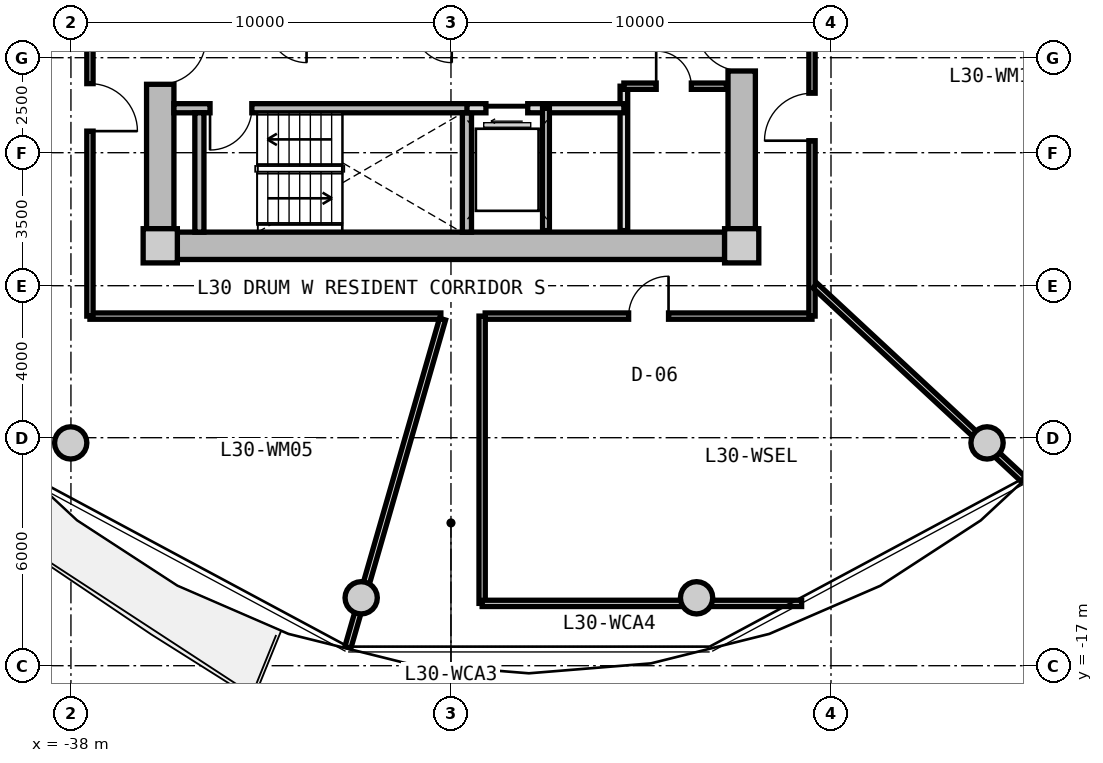
"""IFC4 building model, lengths in metres.
Left out: names, types, materials, properties, quantities, classifications, styles, units other than length and angle.
Written with IfcOpenShell. Run it as: python <this file> out.ifc"""

import sys

from ifc_helpers import new_model, si_unit, direction, frame, frame_2d, origin, origin_2d, place, context, subcontext, project, spatial, rectangle, circle, extrude, source, transform, mapped, element, fill, save


model = new_model("IFC4")
c1 = context("Model", 3, precision=1e-05, world=origin(), true_north=direction((0.0, 1.0)))
c2 = subcontext(c1, "Body", "Model", "MODEL_VIEW")
j1 = project(units=[si_unit("LENGTHUNIT", "METRE"), si_unit("PLANEANGLEUNIT", "RADIAN")], contexts=[c1])
p1 = place(None, origin())
s1 = spatial("IfcSite", under=j1, at=p1, CompositionType="ELEMENT")
p2 = place(p1, origin())
s2 = spatial("IfcBuilding", under=s1, at=p2, CompositionType="ELEMENT")
p3 = place(p2, frame((0.0, 0.0, 99.3)))
s3 = spatial("IfcBuildingStorey", under=s2, at=p3, CompositionType="ELEMENT", Elevation=99.3)
m1 = source(origin(), c2, "Body", "SweptSolid", [
    extrude(rectangle(XDim=0.9, YDim=0.9, at=origin_2d()), origin(), (0.0, 0.0, 1.0), 3.05),
])
for number, where, z_axis, x_axis in (
    (1, (-35.65, -5.95, 0.0), (0.0, 0.0, 1.0), (1.0, 0.0, 0.0)),
    (2, (-20.35, -5.95, 0.0), (0.0, 0.0, 1.0), (1.0, 0.0, 0.0)),
):
    element("IfcColumn", number, at=place(p3, frame(where, z_axis=z_axis, x_axis=x_axis)), inside=s3, PredefinedType="COLUMN", context=c2, shape_type="MappedRepresentation", body=[
        mapped(m1, transform((0.0, 0.0, 0.0), x_axis=(1.0, 0.0, 0.0), y_axis=(0.0, 1.0, 0.0), z_axis=(0.0, 0.0, 1.0), scale=1.0)),
    ])
m2 = source(origin(), c2, "Body", "SweptSolid", [
    extrude(rectangle(XDim=14.4, YDim=0.72, at=frame_2d((7.2, 0.0))), origin(), (0.0, 0.0, 1.0), 2.79),
])
p4 = place(p3, frame((-20.8, -5.95, 0.0), z_axis=(0.0, 0.0, 1.0), x_axis=(-1.0, 0.0, 0.0)))
e3 = element("IfcWall", 3, at=p4, inside=s3, PredefinedType="SHEAR", context=c2, shape_type="MappedRepresentation", body=[
    mapped(m2, transform((0.0, 0.0, 0.0), x_axis=(1.0, 0.0, 0.0), y_axis=(0.0, 1.0, 0.0), z_axis=(0.0, 0.0, 1.0), scale=1.0)),
])
m3 = source(origin(), c2, "Body", "SweptSolid", [
    extrude(rectangle(XDim=11.0, YDim=0.72, at=frame_2d((5.5, 0.0))), origin(), (0.0, 0.0, 1.0), 2.79),
])
p5 = place(p3, frame((-35.65, -5.5, 0.0), z_axis=(0.0, 0.0, 1.0), x_axis=(0.0, 1.0, 0.0)))
e4 = element("IfcWall", 4, at=p5, inside=s3, PredefinedType="SHEAR", context=c2, shape_type="MappedRepresentation", body=[
    mapped(m3, transform((0.0, 0.0, 0.0), x_axis=(1.0, 0.0, 0.0), y_axis=(0.0, 1.0, 0.0), z_axis=(0.0, 0.0, 1.0), scale=1.0)),
])
p6 = place(p5, frame((3.8, 0.0, 0.0)))
e5 = element("IfcOpeningElement", 5, at=p6, cuts=e4, PredefinedType="OPENING", context=c2, shape_type="SweptSolid", body=[
    extrude(rectangle(XDim=1.2, YDim=2.15, at=frame_2d((0.6, 1.075))), frame((0.0, 0.37, 0.0), z_axis=(0.0, -1.0, 0.0), x_axis=(1.0, 0.0, 0.0)), (0.0, 0.0, 1.0), 0.74),
])
p7 = place(p3, frame((-20.35, 5.5, 0.0), z_axis=(0.0, 0.0, 1.0), x_axis=(0.0, -1.0, 0.0)))
e6 = element("IfcWall", 6, at=p7, inside=s3, PredefinedType="SHEAR", context=c2, shape_type="MappedRepresentation", body=[
    mapped(m3, transform((0.0, 0.0, 0.0), x_axis=(1.0, 0.0, 0.0), y_axis=(0.0, 1.0, 0.0), z_axis=(0.0, 0.0, 1.0), scale=1.0)),
])
p8 = place(p7, frame((5.65, 0.0, 0.0)))
e7 = element("IfcOpeningElement", 7, at=p8, cuts=e6, PredefinedType="OPENING", context=c2, shape_type="SweptSolid", body=[
    extrude(rectangle(XDim=1.2, YDim=2.15, at=frame_2d((0.6, 1.075))), frame((0.0, 0.37, 0.0), z_axis=(0.0, -1.0, 0.0), x_axis=(1.0, 0.0, 0.0)), (0.0, 0.0, 1.0), 0.74),
])
m4 = source(origin(), c2, "Body", "SweptSolid", [
    extrude(circle(Radius=0.425, at=origin_2d()), origin(), (0.0, 0.0, 1.0), 3.05),
])
for number, where, z_axis, x_axis in (
    (8, (-38.006, -11.137, 0.0), (0.0, 0.0, 1.0), (1.0, 0.0, 0.0)),
    (9, (-30.363, -15.213, 0.0), (0.0, 0.0, 1.0), (1.0, 0.0, 0.0)),
    (10, (-21.537, -15.213, 0.0), (0.0, 0.0, 1.0), (1.0, 0.0, 0.0)),
    (11, (-13.894, -11.137, 0.0), (0.0, 0.0, 1.0), (1.0, 0.0, 0.0)),
):
    element("IfcColumn", number, at=place(p3, frame(where, z_axis=z_axis, x_axis=x_axis)), inside=s3, PredefinedType="COLUMN", context=c2, shape_type="MappedRepresentation", body=[
        mapped(m4, transform((0.0, 0.0, 0.0), x_axis=(1.0, 0.0, 0.0), y_axis=(0.0, 1.0, 0.0), z_axis=(0.0, 0.0, 1.0), scale=1.0)),
    ])
m5 = source(origin(), c2, "Body", "SweptSolid", [
    extrude(rectangle(XDim=7.83, YDim=0.24, at=frame_2d((3.915, 0.0))), origin(), (0.0, 0.0, 1.0), 2.79),
])
p9 = place(p3, frame((-35.29, -2.33, 0.0), z_axis=(0.0, 0.0, 1.0), x_axis=(1.0, 0.0, 0.0)))
e12 = element("IfcWall", 12, at=p9, inside=s3, PredefinedType="PARTITIONING", context=c2, shape_type="MappedRepresentation", body=[
    mapped(m5, transform((0.0, 0.0, 0.0), x_axis=(1.0, 0.0, 0.0), y_axis=(0.0, 1.0, 0.0), z_axis=(0.0, 0.0, 1.0), scale=1.0)),
])
p10 = place(p9, frame((0.95, 0.0, 0.0)))
e13 = element("IfcOpeningElement", 13, at=p10, cuts=e12, PredefinedType="OPENING", context=c2, shape_type="SweptSolid", body=[
    extrude(rectangle(XDim=1.1, YDim=2.15, at=frame_2d((0.55, 1.075))), frame((0.0, 0.13, 0.0), z_axis=(0.0, -1.0, 0.0), x_axis=(1.0, 0.0, 0.0)), (0.0, 0.0, 1.0), 0.26),
])
m6 = source(origin(), c2, "Body", "SweptSolid", [
    extrude(rectangle(XDim=3.14, YDim=0.24, at=frame_2d((1.57, 0.0))), origin(), (0.0, 0.0, 1.0), 2.79),
])
for number, where, z_axis, x_axis in (
    (14, (-34.62, -5.59, 0.0), (0.0, 0.0, 1.0), (0.0, 1.0, 0.0)),
    (15, (-27.58, -5.59, 0.0), (0.0, 0.0, 1.0), (0.0, 1.0, 0.0)),
):
    element("IfcWall", number, at=place(p3, frame(where, z_axis=z_axis, x_axis=x_axis)), inside=s3, PredefinedType="PARTITIONING", context=c2, shape_type="MappedRepresentation", body=[
        mapped(m6, transform((0.0, 0.0, 0.0), x_axis=(1.0, 0.0, 0.0), y_axis=(0.0, 1.0, 0.0), z_axis=(0.0, 0.0, 1.0), scale=1.0)),
    ])
m7 = source(origin(), c2, "Body", "SweptSolid", [
    extrude(rectangle(XDim=3.8, YDim=0.2, at=frame_2d((1.9, 0.0))), origin(), (0.0, 0.0, 1.0), 2.775),
])
p11 = place(p3, frame((-23.45, -5.55, 0.0), z_axis=(0.0, 0.0, 1.0), x_axis=(0.0, 1.0, 0.0)))
e16 = element("IfcWall", 16, at=p11, inside=s3, PredefinedType="PARTITIONING", context=c2, shape_type="MappedRepresentation", body=[
    mapped(m7, transform((0.0, 0.0, 0.0), x_axis=(1.0, 0.0, 0.0), y_axis=(0.0, 1.0, 0.0), z_axis=(0.0, 0.0, 1.0), scale=1.0)),
])
m8 = source(origin(), c2, "Body", "SweptSolid", [
    extrude(rectangle(XDim=4.13, YDim=0.24, at=frame_2d((2.065, 0.0))), origin(), (0.0, 0.0, 1.0), 2.775),
])
p12 = place(p3, frame((-27.58, -2.33, 0.0), z_axis=(0.0, 0.0, 1.0), x_axis=(1.0, 0.0, 0.0)))
e17 = element("IfcWall", 17, at=p12, inside=s3, PredefinedType="PARTITIONING", context=c2, shape_type="MappedRepresentation", body=[
    mapped(m8, transform((0.0, 0.0, 0.0), x_axis=(1.0, 0.0, 0.0), y_axis=(0.0, 1.0, 0.0), z_axis=(0.0, 0.0, 1.0), scale=1.0)),
])
p13 = place(p12, frame((0.5, 0.0, 0.0)))
e18 = element("IfcOpeningElement", 18, at=p13, cuts=e17, PredefinedType="OPENING", context=c2, shape_type="SweptSolid", body=[
    extrude(rectangle(XDim=1.1, YDim=2.2, at=frame_2d((0.55, 1.1))), frame((0.0, 0.13, 0.0), z_axis=(0.0, -1.0, 0.0), x_axis=(1.0, 0.0, 0.0)), (0.0, 0.0, 1.0), 0.26),
])
m9 = source(origin(), c2, "Body", "SweptSolid", [
    extrude(rectangle(XDim=3.22, YDim=0.18, at=frame_2d((1.61, 0.0))), origin(), (0.0, 0.0, 1.0), 2.775),
])
p14 = place(p3, frame((-25.5, -5.55, 0.0), z_axis=(0.0, 0.0, 1.0), x_axis=(0.0, 1.0, 0.0)))
e19 = element("IfcWall", 19, at=p14, inside=s3, PredefinedType="PARTITIONING", context=c2, shape_type="MappedRepresentation", body=[
    mapped(m9, transform((0.0, 0.0, 0.0), x_axis=(1.0, 0.0, 0.0), y_axis=(0.0, 1.0, 0.0), z_axis=(0.0, 0.0, 1.0), scale=1.0)),
])
m10 = source(origin(), c2, "Body", "SweptSolid", [
    extrude(rectangle(XDim=2.7, YDim=0.165, at=frame_2d((1.35, 0.0))), origin(), (0.0, 0.0, 1.0), 2.775),
])
p15 = place(p3, frame((-23.45, -1.75, 0.0), z_axis=(0.0, 0.0, 1.0), x_axis=(1.0, 0.0, 0.0)))
e20 = element("IfcWall", 20, at=p15, inside=s3, PredefinedType="PARTITIONING", context=c2, shape_type="MappedRepresentation", body=[
    mapped(m10, transform((0.0, 0.0, 0.0), x_axis=(1.0, 0.0, 0.0), y_axis=(0.0, 1.0, 0.0), z_axis=(0.0, 0.0, 1.0), scale=1.0)),
])
p16 = place(p15, frame((0.85, 0.0, 0.0)))
e21 = element("IfcOpeningElement", 21, at=p16, cuts=e20, PredefinedType="OPENING", context=c2, shape_type="SweptSolid", body=[
    extrude(rectangle(XDim=0.925, YDim=2.1, at=frame_2d((0.462, 1.05))), frame((0.0, 0.093, 0.0), z_axis=(0.0, -1.0, 0.0), x_axis=(1.0, 0.0, 0.0)), (0.0, 0.0, 1.0), 0.185),
])
m11 = source(origin(), c2, "Body", "SweptSolid", [
    extrude(rectangle(XDim=8.6, YDim=0.165, at=frame_2d((4.3, 0.0))), origin(), (0.0, 0.0, 1.0), 2.775),
])
p17 = place(p3, frame((-18.5, -7.8, 0.0), z_axis=(0.0, 0.0, 1.0), x_axis=(-1.0, 0.0, 0.0)))
e22 = element("IfcWall", 22, at=p17, inside=s3, PredefinedType="PARTITIONING", context=c2, shape_type="MappedRepresentation", body=[
    mapped(m11, transform((0.0, 0.0, 0.0), x_axis=(1.0, 0.0, 0.0), y_axis=(0.0, 1.0, 0.0), z_axis=(0.0, 0.0, 1.0), scale=1.0)),
])
p18 = place(p17, frame((3.775, 0.0, 0.0)))
e23 = element("IfcOpeningElement", 23, at=p18, cuts=e22, PredefinedType="OPENING", context=c2, shape_type="SweptSolid", body=[
    extrude(rectangle(XDim=1.05, YDim=2.15, at=frame_2d((0.525, 1.075))), frame((0.0, 0.093, 0.0), z_axis=(0.0, -1.0, 0.0), x_axis=(1.0, 0.0, 0.0)), (0.0, 0.0, 1.0), 0.185),
])
m12 = source(origin(), c2, "Body", "SweptSolid", [
    extrude(rectangle(XDim=9.234, YDim=0.165, at=frame_2d((4.617, 0.0))), origin(), (0.0, 0.0, 1.0), 2.775),
])
p19 = place(p3, frame((-28.266, -7.8, 0.0), z_axis=(0.0, 0.0, 1.0), x_axis=(-1.0, 0.0, 0.0)))
e24 = element("IfcWall", 24, at=p19, inside=s3, PredefinedType="PARTITIONING", context=c2, shape_type="MappedRepresentation", body=[
    mapped(m12, transform((0.0, 0.0, 0.0), x_axis=(1.0, 0.0, 0.0), y_axis=(0.0, 1.0, 0.0), z_axis=(0.0, 0.0, 1.0), scale=1.0)),
])
m13 = source(origin(), c2, "Body", "SweptSolid", [
    extrude(rectangle(XDim=15.6, YDim=0.165, at=frame_2d((7.8, 0.0))), origin(), (0.0, 0.0, 1.0), 2.775),
])
p20 = place(p3, frame((-37.5, -7.8, 0.0), z_axis=(0.0, 0.0, 1.0), x_axis=(0.0, 1.0, 0.0)))
e25 = element("IfcWall", 25, at=p20, inside=s3, PredefinedType="PARTITIONING", context=c2, shape_type="MappedRepresentation", body=[
    mapped(m13, transform((0.0, 0.0, 0.0), x_axis=(1.0, 0.0, 0.0), y_axis=(0.0, 1.0, 0.0), z_axis=(0.0, 0.0, 1.0), scale=1.0)),
])
p21 = place(p20, frame((11.994, 0.0, 0.0)))
e26 = element("IfcOpeningElement", 26, at=p21, cuts=e25, PredefinedType="OPENING", context=c2, shape_type="SweptSolid", body=[
    extrude(rectangle(XDim=1.25, YDim=2.2, at=frame_2d((0.625, 1.1))), frame((0.0, 0.093, 0.0), z_axis=(0.0, -1.0, 0.0), x_axis=(1.0, 0.0, 0.0)), (0.0, 0.0, 1.0), 0.185),
])
p22 = place(p20, frame((4.867, 0.0, 0.0)))
e27 = element("IfcOpeningElement", 27, at=p22, cuts=e25, PredefinedType="OPENING", context=c2, shape_type="SweptSolid", body=[
    extrude(rectangle(XDim=1.25, YDim=2.2, at=frame_2d((0.625, 1.1))), frame((0.0, 0.093, 0.0), z_axis=(0.0, -1.0, 0.0), x_axis=(1.0, 0.0, 0.0)), (0.0, 0.0, 1.0), 0.185),
])
p23 = place(p3, frame((-18.5, 7.8, 0.0), z_axis=(0.0, 0.0, 1.0), x_axis=(0.0, -1.0, 0.0)))
e28 = element("IfcWall", 28, at=p23, inside=s3, PredefinedType="PARTITIONING", context=c2, shape_type="MappedRepresentation", body=[
    mapped(m13, transform((0.0, 0.0, 0.0), x_axis=(1.0, 0.0, 0.0), y_axis=(0.0, 1.0, 0.0), z_axis=(0.0, 0.0, 1.0), scale=1.0)),
])
p24 = place(p23, frame((9.734, 0.0, 0.0)))
e29 = element("IfcOpeningElement", 29, at=p24, cuts=e28, PredefinedType="OPENING", context=c2, shape_type="SweptSolid", body=[
    extrude(rectangle(XDim=1.25, YDim=2.2, at=frame_2d((0.625, 1.1))), frame((0.0, 0.093, 0.0), z_axis=(0.0, -1.0, 0.0), x_axis=(1.0, 0.0, 0.0)), (0.0, 0.0, 1.0), 0.185),
])
p25 = place(p23, frame((4.739, 0.0, 0.0)))
e30 = element("IfcOpeningElement", 30, at=p25, cuts=e28, PredefinedType="OPENING", context=c2, shape_type="SweptSolid", body=[
    extrude(rectangle(XDim=0.92, YDim=2.1, at=frame_2d((0.46, 1.05))), frame((0.0, 0.093, 0.0), z_axis=(0.0, -1.0, 0.0), x_axis=(1.0, 0.0, 0.0)), (0.0, 0.0, 1.0), 0.185),
])
p26 = place(p23, frame((2.096, 0.0, 0.0)))
e31 = element("IfcOpeningElement", 31, at=p26, cuts=e28, PredefinedType="OPENING", context=c2, shape_type="SweptSolid", body=[
    extrude(rectangle(XDim=0.92, YDim=2.1, at=frame_2d((0.46, 1.05))), frame((0.0, 0.093, 0.0), z_axis=(0.0, -1.0, 0.0), x_axis=(1.0, 0.0, 0.0)), (0.0, 0.0, 1.0), 0.185),
])
m14 = source(origin(), c2, "Body", "SweptSolid", [
    extrude(rectangle(XDim=8.989, YDim=0.165, at=frame_2d((4.495, 0.0))), origin(), (0.0, 0.0, 1.0), 2.275),
])
p27 = place(p3, frame((-28.222, -7.88, 0.0), z_axis=(0.0, 0.0, 1.0), x_axis=(-0.27702323008, -0.960863221274, 0.0)))
e32 = element("IfcWall", 32, at=p27, inside=s3, PredefinedType="PARTITIONING", context=c2, shape_type="MappedRepresentation", body=[
    mapped(m14, transform((0.0, 0.0, 0.0), x_axis=(1.0, 0.0, 0.0), y_axis=(0.0, 1.0, 0.0), z_axis=(0.0, 0.0, 1.0), scale=1.0)),
])
m15 = source(origin(), c2, "Body", "SweptSolid", [
    extrude(rectangle(XDim=7.482, YDim=0.165, at=frame_2d((3.741, 0.0))), origin(), (0.0, 0.0, 1.0), 2.275),
])
p28 = place(p3, frame((-18.42, -6.998, 0.0), z_axis=(0.0, 0.0, 1.0), x_axis=(0.732508698043, -0.680757671489, 0.0)))
e33 = element("IfcWall", 33, at=p28, inside=s3, PredefinedType="PARTITIONING", context=c2, shape_type="MappedRepresentation", body=[
    mapped(m15, transform((0.0, 0.0, 0.0), x_axis=(1.0, 0.0, 0.0), y_axis=(0.0, 1.0, 0.0), z_axis=(0.0, 0.0, 1.0), scale=1.0)),
])
m16 = source(origin(), c2, "Body", "SweptSolid", [
    extrude(rectangle(XDim=7.56, YDim=0.165, at=frame_2d((3.78, 0.0))), origin(), (0.0, 0.0, 1.0), 2.775),
])
p29 = place(p3, frame((-27.18, -15.36, 0.0), z_axis=(0.0, 0.0, 1.0), x_axis=(0.0, 1.0, 0.0)))
e34 = element("IfcWall", 34, at=p29, inside=s3, PredefinedType="PARTITIONING", context=c2, shape_type="MappedRepresentation", body=[
    mapped(m16, transform((0.0, 0.0, 0.0), x_axis=(1.0, 0.0, 0.0), y_axis=(0.0, 1.0, 0.0), z_axis=(0.0, 0.0, 1.0), scale=1.0)),
])
m17 = source(origin(), c2, "Body", "SweptSolid", [
    extrude(rectangle(XDim=8.407, YDim=0.165, at=frame_2d((4.204, 0.0))), origin(), (0.0, 0.0, 1.0), 2.275),
])
p30 = place(p3, frame((-27.18, -15.36, 0.0), z_axis=(0.0, 0.0, 1.0), x_axis=(1.0, 0.0, 0.0)))
e35 = element("IfcWall", 35, at=p30, inside=s3, PredefinedType="PARTITIONING", context=c2, shape_type="MappedRepresentation", body=[
    mapped(m17, transform((0.0, 0.0, 0.0), x_axis=(1.0, 0.0, 0.0), y_axis=(0.0, 1.0, 0.0), z_axis=(0.0, 0.0, 1.0), scale=1.0)),
])
m18 = source(origin(), c2, "Body", "SweptSolid", [
    extrude(rectangle(XDim=1.1, YDim=2.15, at=frame_2d((0.55, 1.075))), frame((0.0, 0.025, 0.0), z_axis=(0.0, -1.0, 0.0), x_axis=(1.0, 0.0, 0.0)), (0.0, 0.0, 1.0), 0.05),
])
p31 = place(p10, frame((1.1, 0.0, 0.0), z_axis=(0.0, 0.0, 1.0), x_axis=(-1.0, 0.0, 0.0)))
e36 = element("IfcDoor", 36, at=p31, inside=s3, OperationType="SINGLE_SWING_RIGHT", PredefinedType="DOOR", context=c2, shape_type="MappedRepresentation", body=[
    mapped(m18, transform((0.0, 0.0, 0.0), x_axis=(1.0, 0.0, 0.0), y_axis=(0.0, 1.0, 0.0), z_axis=(0.0, 0.0, 1.0), scale=1.0)),
])
fill(e13, e36)
m19 = source(origin(), c2, "Body", "SweptSolid", [
    extrude(rectangle(XDim=1.2, YDim=2.15, at=frame_2d((0.6, 1.075))), frame((0.0, 0.025, 0.0), z_axis=(0.0, -1.0, 0.0), x_axis=(1.0, 0.0, 0.0)), (0.0, 0.0, 1.0), 0.05),
])
p32 = place(p6, frame((1.2, 0.0, 0.0), z_axis=(0.0, 0.0, 1.0), x_axis=(-1.0, 0.0, 0.0)))
e37 = element("IfcDoor", 37, at=p32, inside=s3, OperationType="SINGLE_SWING_LEFT", PredefinedType="DOOR", context=c2, shape_type="MappedRepresentation", body=[
    mapped(m19, transform((0.0, 0.0, 0.0), x_axis=(1.0, 0.0, 0.0), y_axis=(0.0, 1.0, 0.0), z_axis=(0.0, 0.0, 1.0), scale=1.0)),
])
fill(e5, e37)
p33 = place(p8, frame((1.2, 0.0, 0.0), z_axis=(0.0, 0.0, 1.0), x_axis=(-1.0, 0.0, 0.0)))
e38 = element("IfcDoor", 38, at=p33, inside=s3, OperationType="SINGLE_SWING_RIGHT", PredefinedType="DOOR", context=c2, shape_type="MappedRepresentation", body=[
    mapped(m19, transform((0.0, 0.0, 0.0), x_axis=(1.0, 0.0, 0.0), y_axis=(0.0, 1.0, 0.0), z_axis=(0.0, 0.0, 1.0), scale=1.0)),
])
fill(e7, e38)
m20 = source(origin(), c2, "Body", "SweptSolid", [
    extrude(rectangle(XDim=1.1, YDim=2.2, at=frame_2d((0.55, 1.1))), frame((0.0, 0.025, 0.0), z_axis=(0.0, -1.0, 0.0), x_axis=(1.0, 0.0, 0.0)), (0.0, 0.0, 1.0), 0.05),
])
p34 = place(p13, frame((1.1, 0.0, 0.0), z_axis=(0.0, 0.0, 1.0), x_axis=(-1.0, 0.0, 0.0)))
e39 = element("IfcDoor", 39, at=p34, inside=s3, OperationType="SLIDING_TO_LEFT", PredefinedType="DOOR", context=c2, shape_type="MappedRepresentation", body=[
    mapped(m20, transform((0.0, 0.0, 0.0), x_axis=(1.0, 0.0, 0.0), y_axis=(0.0, 1.0, 0.0), z_axis=(0.0, 0.0, 1.0), scale=1.0)),
])
fill(e18, e39)
m21 = source(origin(), c2, "Body", "SweptSolid", [
    extrude(rectangle(XDim=0.925, YDim=2.1, at=frame_2d((0.462, 1.05))), frame((0.0, 0.025, 0.0), z_axis=(0.0, -1.0, 0.0), x_axis=(1.0, 0.0, 0.0)), (0.0, 0.0, 1.0), 0.05),
])
p35 = place(p16, origin())
e40 = element("IfcDoor", 40, at=p35, inside=s3, OperationType="SINGLE_SWING_LEFT", PredefinedType="DOOR", context=c2, shape_type="MappedRepresentation", body=[
    mapped(m21, transform((0.0, 0.0, 0.0), x_axis=(1.0, 0.0, 0.0), y_axis=(0.0, 1.0, 0.0), z_axis=(0.0, 0.0, 1.0), scale=1.0)),
])
fill(e21, e40)
m22 = source(origin(), c2, "Body", "SweptSolid", [
    extrude(rectangle(XDim=1.05, YDim=2.15, at=frame_2d((0.525, 1.075))), frame((0.0, 0.025, 0.0), z_axis=(0.0, -1.0, 0.0), x_axis=(1.0, 0.0, 0.0)), (0.0, 0.0, 1.0), 0.05),
])
p36 = place(p18, frame((1.05, 0.0, 0.0), z_axis=(0.0, 0.0, 1.0), x_axis=(-1.0, 0.0, 0.0)))
e41 = element("IfcDoor", 41, at=p36, inside=s3, OperationType="SINGLE_SWING_RIGHT", PredefinedType="DOOR", context=c2, shape_type="MappedRepresentation", body=[
    mapped(m22, transform((0.0, 0.0, 0.0), x_axis=(1.0, 0.0, 0.0), y_axis=(0.0, 1.0, 0.0), z_axis=(0.0, 0.0, 1.0), scale=1.0)),
])
fill(e23, e41)
m23 = source(origin(), c2, "Body", "SweptSolid", [
    extrude(rectangle(XDim=1.25, YDim=2.2, at=frame_2d((0.625, 1.1))), frame((0.0, 0.025, 0.0), z_axis=(0.0, -1.0, 0.0), x_axis=(1.0, 0.0, 0.0)), (0.0, 0.0, 1.0), 0.05),
])
p37 = place(p22, frame((1.25, 0.0, 0.0), z_axis=(0.0, 0.0, 1.0), x_axis=(-1.0, 0.0, 0.0)))
e42 = element("IfcDoor", 42, at=p37, inside=s3, OperationType="SINGLE_SWING_RIGHT", PredefinedType="DOOR", context=c2, shape_type="MappedRepresentation", body=[
    mapped(m23, transform((0.0, 0.0, 0.0), x_axis=(1.0, 0.0, 0.0), y_axis=(0.0, 1.0, 0.0), z_axis=(0.0, 0.0, 1.0), scale=1.0)),
])
fill(e27, e42)
p38 = place(p24, frame((1.25, 0.0, 0.0), z_axis=(0.0, 0.0, 1.0), x_axis=(-1.0, 0.0, 0.0)))
e43 = element("IfcDoor", 43, at=p38, inside=s3, OperationType="SINGLE_SWING_LEFT", PredefinedType="DOOR", context=c2, shape_type="MappedRepresentation", body=[
    mapped(m23, transform((0.0, 0.0, 0.0), x_axis=(1.0, 0.0, 0.0), y_axis=(0.0, 1.0, 0.0), z_axis=(0.0, 0.0, 1.0), scale=1.0)),
])
fill(e29, e43)
save(model, sys.argv[1])
